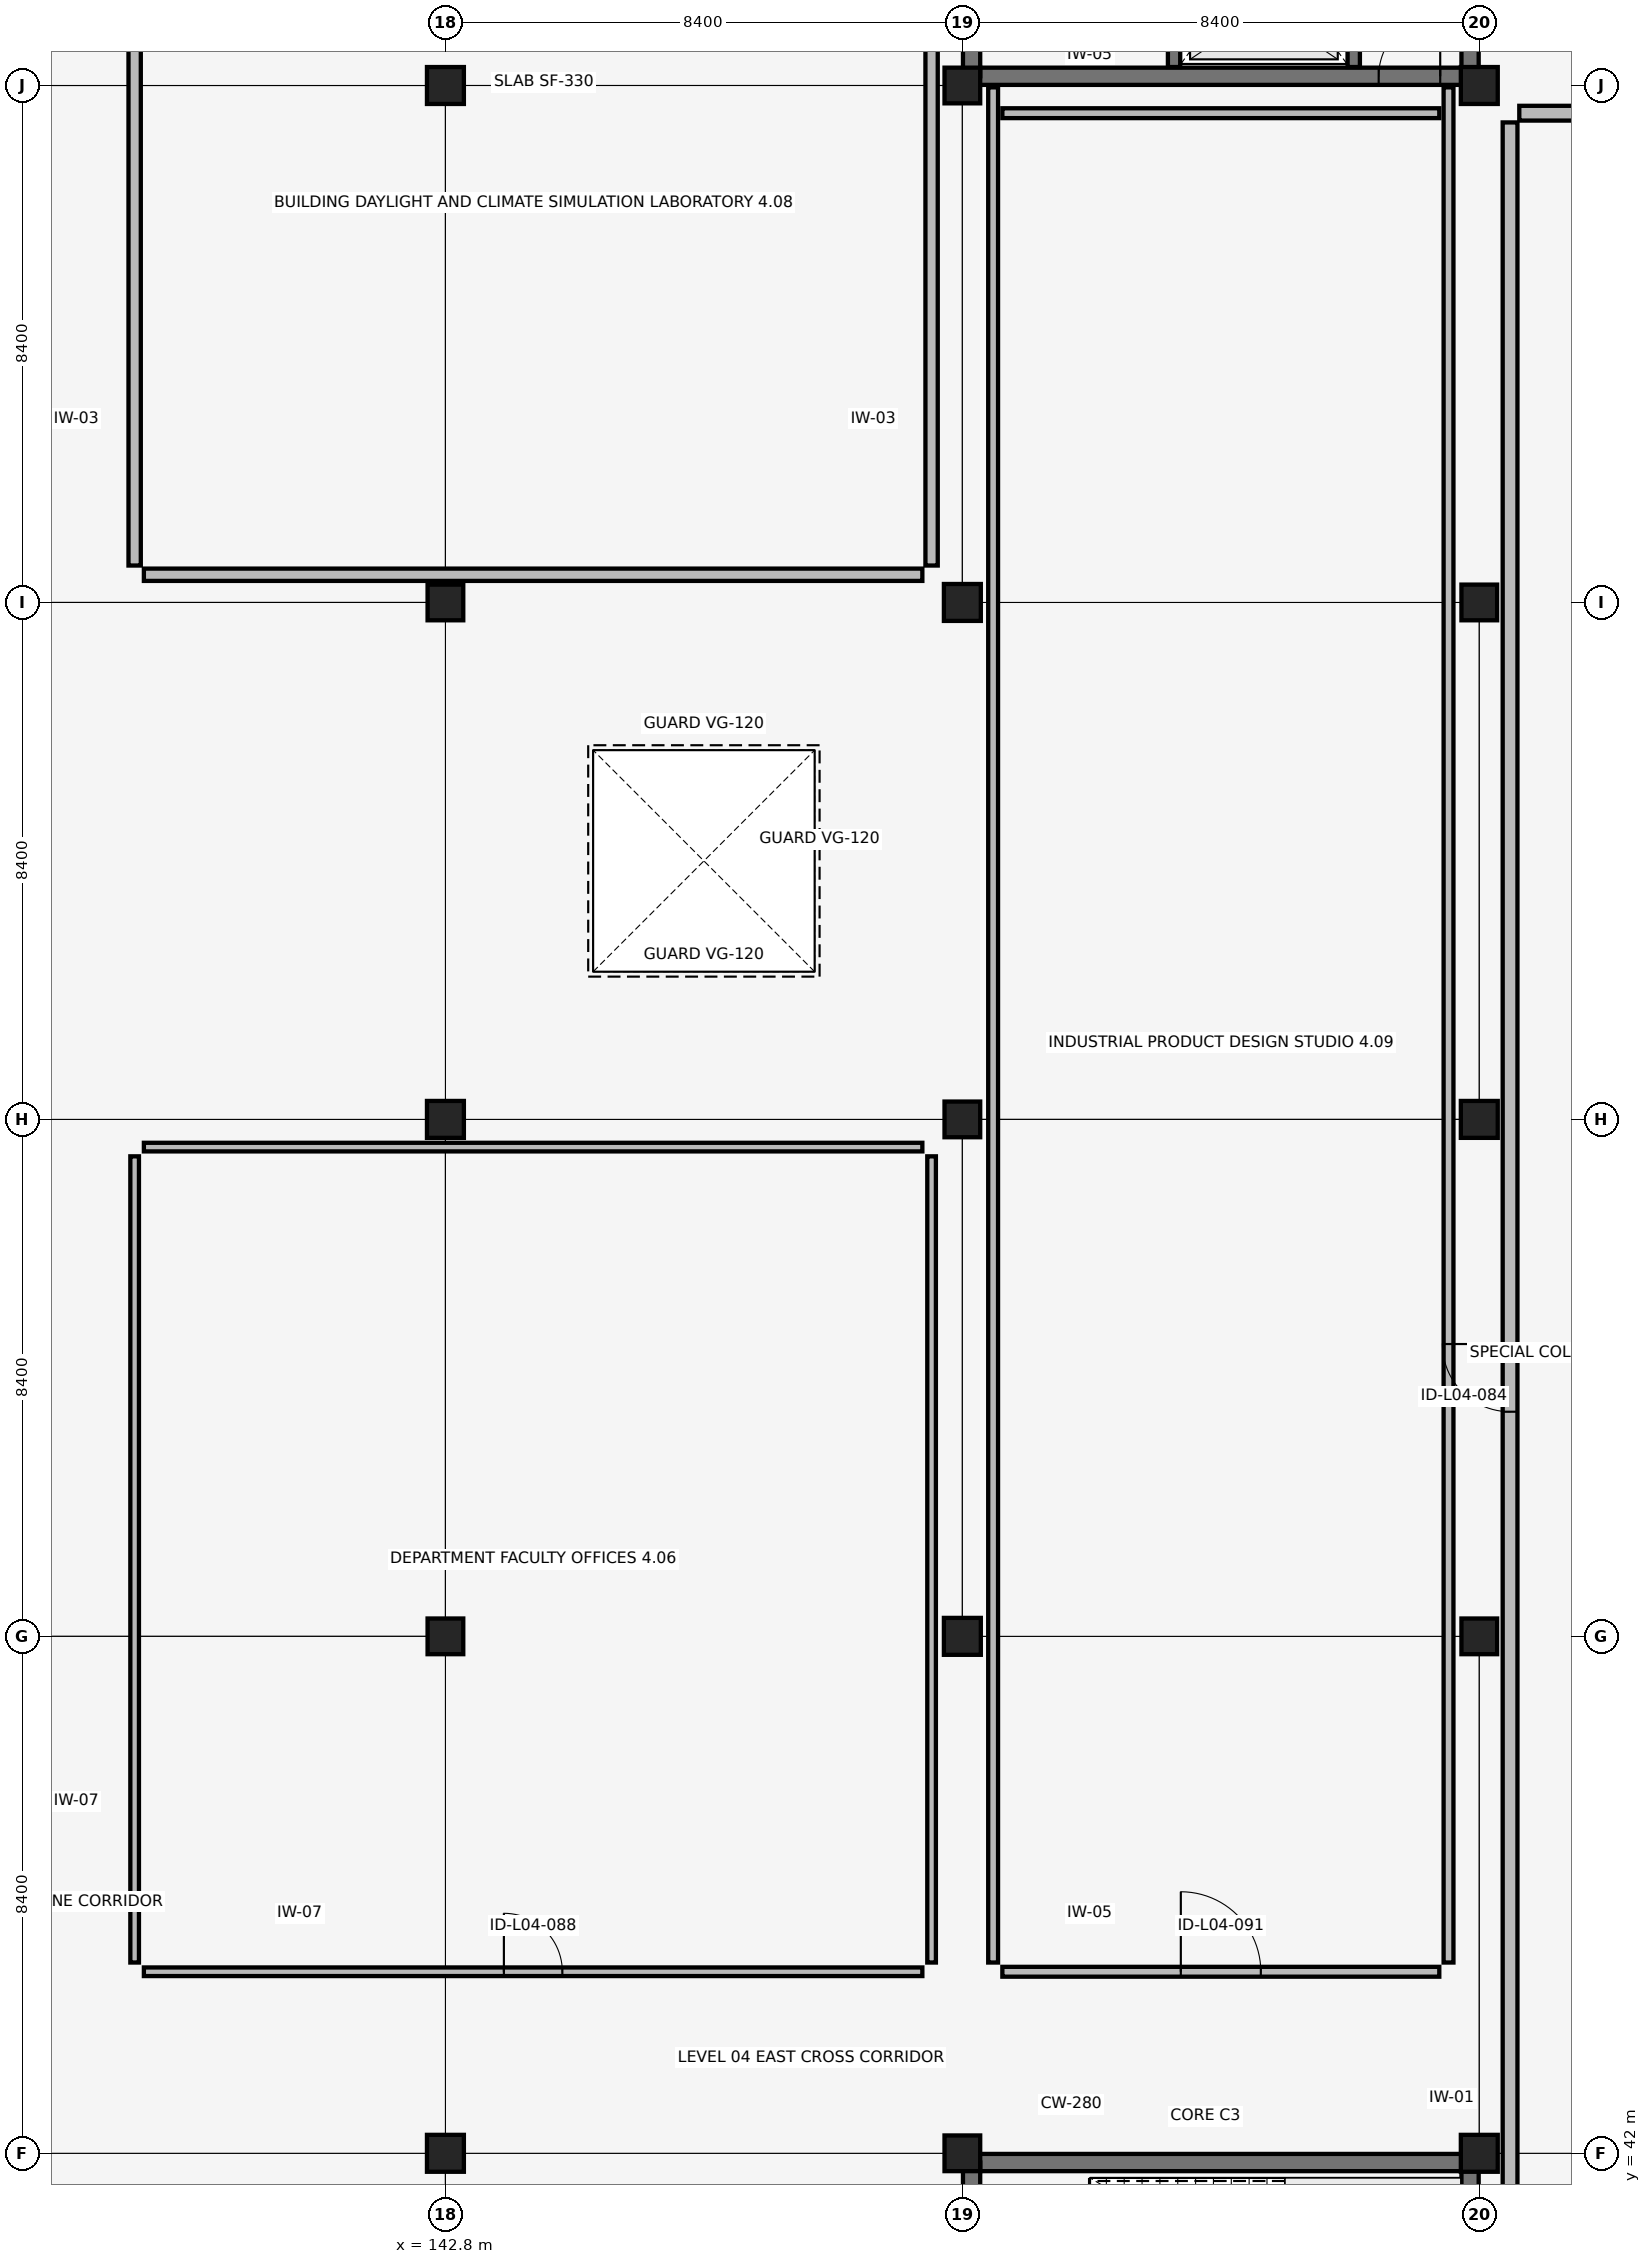
"""IFC4 building model, lengths in metres.
Left out: names, types, materials, properties, quantities, classifications, styles, units other than length and angle.
Written with IfcOpenShell. Run it as: python <this file> out.ifc"""

import sys

from ifc_helpers import new_model, si_unit, direction, frame, frame_2d, origin, origin_2d, place, context, subcontext, project, spatial, rectangle, extrude, element, fill, save


model = new_model("IFC4")
c1 = context("Model", 3, precision=1e-05, world=origin(), true_north=direction((0.0, 1.0)))
c2 = subcontext(c1, "Body", "Model", "MODEL_VIEW")
j1 = project(units=[si_unit("LENGTHUNIT", "METRE"), si_unit("PLANEANGLEUNIT", "RADIAN")], contexts=[c1])
p1 = place(None, origin())
s1 = spatial("IfcSite", under=j1, at=p1, CompositionType="ELEMENT")
p2 = place(p1, origin())
s2 = spatial("IfcBuilding", under=s1, at=p2, CompositionType="ELEMENT")
p3 = place(p2, frame((0.0, 0.0, 18.02)))
s3 = spatial("IfcBuildingStorey", under=s2, at=p3, CompositionType="ELEMENT", Elevation=18.02)
p4 = place(p3, frame((151.35, 41.85, 0.0), z_axis=(0.0, 0.0, 1.0), x_axis=(1.0, 0.0, 0.0)))
e1 = element("IfcWall", 1, at=p4, inside=s3, PredefinedType="SHEAR", context=c2, shape_type="SweptSolid", body=[
    extrude(rectangle(XDim=8.1, YDim=0.28, at=frame_2d((4.05, 0.0))), origin(), (0.0, 0.0, 1.0), 3.78),
])
p5 = place(p3, frame((151.35, 33.75, 0.0), z_axis=(0.0, 0.0, 1.0), x_axis=(0.0, 1.0, 0.0)))
e2 = element("IfcWall", 2, at=p5, inside=s3, PredefinedType="SHEAR", context=c2, shape_type="SweptSolid", body=[
    extrude(rectangle(XDim=8.1, YDim=0.28, at=frame_2d((4.05, 0.0))), origin(), (0.0, 0.0, 1.0), 3.78),
])
p6 = place(p5, frame((1.325, 0.0, 0.0)))
e3 = element("IfcOpeningElement", 3, at=p6, cuts=e2, PredefinedType="OPENING", context=c2, shape_type="SweptSolid", body=[
    extrude(rectangle(XDim=1.45, YDim=2.15, at=frame_2d((0.725, 1.075))), frame((0.0, 0.15, 0.0), z_axis=(0.0, -1.0, 0.0), x_axis=(1.0, 0.0, 0.0)), (0.0, 0.0, 1.0), 0.3),
])
p7 = place(p3, frame((159.45, 33.75, 0.0), z_axis=(0.0, 0.0, 1.0), x_axis=(0.0, 1.0, 0.0)))
e4 = element("IfcWall", 4, at=p7, inside=s3, PredefinedType="SHEAR", context=c2, shape_type="SweptSolid", body=[
    extrude(rectangle(XDim=8.1, YDim=0.28, at=frame_2d((4.05, 0.0))), origin(), (0.0, 0.0, 1.0), 3.78),
])
p8 = place(p3, frame((151.35, 75.75, 0.0), z_axis=(0.0, 0.0, 1.0), x_axis=(1.0, 0.0, 0.0)))
e5 = element("IfcWall", 5, at=p8, inside=s3, PredefinedType="SHEAR", context=c2, shape_type="SweptSolid", body=[
    extrude(rectangle(XDim=8.1, YDim=0.28, at=frame_2d((4.05, 0.0))), origin(), (0.0, 0.0, 1.0), 3.78),
])
p9 = place(p8, frame((6.615, 0.0, 0.0)))
e6 = element("IfcOpeningElement", 6, at=p9, cuts=e5, PredefinedType="OPENING", context=c2, shape_type="SweptSolid", body=[
    extrude(rectangle(XDim=1.0, YDim=2.15, at=frame_2d((0.5, 1.075))), frame((0.0, 0.15, 0.0), z_axis=(0.0, -1.0, 0.0), x_axis=(1.0, 0.0, 0.0)), (0.0, 0.0, 1.0), 0.3),
])
p10 = place(p3, frame((151.35, 75.75, 0.0), z_axis=(0.0, 0.0, 1.0), x_axis=(0.0, 1.0, 0.0)))
e7 = element("IfcWall", 7, at=p10, inside=s3, PredefinedType="SHEAR", context=c2, shape_type="SweptSolid", body=[
    extrude(rectangle(XDim=8.1, YDim=0.28, at=frame_2d((4.05, 0.0))), origin(), (0.0, 0.0, 1.0), 3.78),
])
p11 = place(p10, frame((1.325, 0.0, 0.0)))
e8 = element("IfcOpeningElement", 8, at=p11, cuts=e7, PredefinedType="OPENING", context=c2, shape_type="SweptSolid", body=[
    extrude(rectangle(XDim=1.45, YDim=2.15, at=frame_2d((0.725, 1.075))), frame((0.0, 0.15, 0.0), z_axis=(0.0, -1.0, 0.0), x_axis=(1.0, 0.0, 0.0)), (0.0, 0.0, 1.0), 0.3),
])
p12 = place(p3, frame((159.45, 75.75, 0.0), z_axis=(0.0, 0.0, 1.0), x_axis=(0.0, 1.0, 0.0)))
e9 = element("IfcWall", 9, at=p12, inside=s3, PredefinedType="SHEAR", context=c2, shape_type="SweptSolid", body=[
    extrude(rectangle(XDim=8.1, YDim=0.28, at=frame_2d((4.05, 0.0))), origin(), (0.0, 0.0, 1.0), 3.78),
])
p13 = place(p3, frame((142.8, 42.0, 0.0), z_axis=(0.0, 0.0, 1.0), x_axis=(1.0, 0.0, 0.0)))
e10 = element("IfcColumn", 10, at=p13, inside=s3, PredefinedType="COLUMN", context=c2, shape_type="SweptSolid", body=[
    extrude(rectangle(XDim=0.6, YDim=0.6, at=origin_2d()), origin(), (0.0, 0.0, 1.0), 3.78),
])
p14 = place(p3, frame((142.8, 50.4, 0.0), z_axis=(0.0, 0.0, 1.0), x_axis=(1.0, 0.0, 0.0)))
e11 = element("IfcColumn", 11, at=p14, inside=s3, PredefinedType="COLUMN", context=c2, shape_type="SweptSolid", body=[
    extrude(rectangle(XDim=0.58, YDim=0.58, at=origin_2d()), origin(), (0.0, 0.0, 1.0), 3.78),
])
p15 = place(p3, frame((142.8, 58.8, 0.0), z_axis=(0.0, 0.0, 1.0), x_axis=(1.0, 0.0, 0.0)))
e12 = element("IfcColumn", 12, at=p15, inside=s3, PredefinedType="COLUMN", context=c2, shape_type="SweptSolid", body=[
    extrude(rectangle(XDim=0.6, YDim=0.6, at=origin_2d()), origin(), (0.0, 0.0, 1.0), 3.78),
])
p16 = place(p3, frame((142.8, 67.2, 0.0), z_axis=(0.0, 0.0, 1.0), x_axis=(1.0, 0.0, 0.0)))
e13 = element("IfcColumn", 13, at=p16, inside=s3, PredefinedType="COLUMN", context=c2, shape_type="SweptSolid", body=[
    extrude(rectangle(XDim=0.58, YDim=0.58, at=origin_2d()), origin(), (0.0, 0.0, 1.0), 3.78),
])
p17 = place(p3, frame((142.8, 75.6, 0.0), z_axis=(0.0, 0.0, 1.0), x_axis=(1.0, 0.0, 0.0)))
e14 = element("IfcColumn", 14, at=p17, inside=s3, PredefinedType="COLUMN", context=c2, shape_type="SweptSolid", body=[
    extrude(rectangle(XDim=0.6, YDim=0.6, at=origin_2d()), origin(), (0.0, 0.0, 1.0), 3.78),
])
p18 = place(p3, frame((151.2, 42.0, 0.0), z_axis=(0.0, 0.0, 1.0), x_axis=(1.0, 0.0, 0.0)))
e15 = element("IfcColumn", 15, at=p18, inside=s3, PredefinedType="COLUMN", context=c2, shape_type="SweptSolid", body=[
    extrude(rectangle(XDim=0.58, YDim=0.58, at=origin_2d()), origin(), (0.0, 0.0, 1.0), 3.78),
])
p19 = place(p3, frame((151.2, 50.4, 0.0), z_axis=(0.0, 0.0, 1.0), x_axis=(1.0, 0.0, 0.0)))
e16 = element("IfcColumn", 16, at=p19, inside=s3, PredefinedType="COLUMN", context=c2, shape_type="SweptSolid", body=[
    extrude(rectangle(XDim=0.6, YDim=0.6, at=origin_2d()), origin(), (0.0, 0.0, 1.0), 3.78),
])
p20 = place(p3, frame((151.2, 58.8, 0.0), z_axis=(0.0, 0.0, 1.0), x_axis=(1.0, 0.0, 0.0)))
e17 = element("IfcColumn", 17, at=p20, inside=s3, PredefinedType="COLUMN", context=c2, shape_type="SweptSolid", body=[
    extrude(rectangle(XDim=0.58, YDim=0.58, at=origin_2d()), origin(), (0.0, 0.0, 1.0), 3.78),
])
p21 = place(p3, frame((151.2, 67.2, 0.0), z_axis=(0.0, 0.0, 1.0), x_axis=(1.0, 0.0, 0.0)))
e18 = element("IfcColumn", 18, at=p21, inside=s3, PredefinedType="COLUMN", context=c2, shape_type="SweptSolid", body=[
    extrude(rectangle(XDim=0.6, YDim=0.6, at=origin_2d()), origin(), (0.0, 0.0, 1.0), 3.78),
])
p22 = place(p3, frame((151.2, 75.6, 0.0), z_axis=(0.0, 0.0, 1.0), x_axis=(1.0, 0.0, 0.0)))
e19 = element("IfcColumn", 19, at=p22, inside=s3, PredefinedType="COLUMN", context=c2, shape_type="SweptSolid", body=[
    extrude(rectangle(XDim=0.58, YDim=0.58, at=origin_2d()), origin(), (0.0, 0.0, 1.0), 3.78),
])
p23 = place(p3, frame((159.6, 42.0, 0.0), z_axis=(0.0, 0.0, 1.0), x_axis=(1.0, 0.0, 0.0)))
e20 = element("IfcColumn", 20, at=p23, inside=s3, PredefinedType="COLUMN", context=c2, shape_type="SweptSolid", body=[
    extrude(rectangle(XDim=0.6, YDim=0.6, at=origin_2d()), origin(), (0.0, 0.0, 1.0), 3.78),
])
p24 = place(p3, frame((159.6, 50.4, 0.0), z_axis=(0.0, 0.0, 1.0), x_axis=(1.0, 0.0, 0.0)))
e21 = element("IfcColumn", 21, at=p24, inside=s3, PredefinedType="COLUMN", context=c2, shape_type="SweptSolid", body=[
    extrude(rectangle(XDim=0.58, YDim=0.58, at=origin_2d()), origin(), (0.0, 0.0, 1.0), 3.78),
])
p25 = place(p3, frame((159.6, 58.8, 0.0), z_axis=(0.0, 0.0, 1.0), x_axis=(1.0, 0.0, 0.0)))
e22 = element("IfcColumn", 22, at=p25, inside=s3, PredefinedType="COLUMN", context=c2, shape_type="SweptSolid", body=[
    extrude(rectangle(XDim=0.6, YDim=0.6, at=origin_2d()), origin(), (0.0, 0.0, 1.0), 3.78),
])
p26 = place(p3, frame((159.6, 67.2, 0.0), z_axis=(0.0, 0.0, 1.0), x_axis=(1.0, 0.0, 0.0)))
e23 = element("IfcColumn", 23, at=p26, inside=s3, PredefinedType="COLUMN", context=c2, shape_type="SweptSolid", body=[
    extrude(rectangle(XDim=0.58, YDim=0.58, at=origin_2d()), origin(), (0.0, 0.0, 1.0), 3.78),
])
p27 = place(p3, frame((159.6, 75.6, 0.0), z_axis=(0.0, 0.0, 1.0), x_axis=(1.0, 0.0, 0.0)))
e24 = element("IfcColumn", 24, at=p27, inside=s3, PredefinedType="COLUMN", context=c2, shape_type="SweptSolid", body=[
    extrude(rectangle(XDim=0.6, YDim=0.6, at=origin_2d()), origin(), (0.0, 0.0, 1.0), 3.78),
])
p28 = place(p3, frame((154.64, 75.9, 0.0), z_axis=(0.0, 0.0, 1.0), x_axis=(0.0, 1.0, 0.0)))
e25 = element("IfcWall", 25, at=p28, inside=s3, PredefinedType="SHEAR", context=c2, shape_type="SweptSolid", body=[
    extrude(rectangle(XDim=3.8, YDim=0.2, at=frame_2d((1.9, 0.0))), origin(), (0.0, 0.0, 1.0), 3.78),
])
p29 = place(p28, frame((0.375, 0.0, 0.0)))
e26 = element("IfcOpeningElement", 26, at=p29, cuts=e25, PredefinedType="OPENING", context=c2, shape_type="SweptSolid", body=[
    extrude(rectangle(XDim=1.1, YDim=2.15, at=frame_2d((0.55, 1.075))), frame((0.0, 0.11, 0.0), z_axis=(0.0, -1.0, 0.0), x_axis=(1.0, 0.0, 0.0)), (0.0, 0.0, 1.0), 0.22),
])
p30 = place(p28, frame((2.325, 0.0, 0.0)))
e27 = element("IfcOpeningElement", 27, at=p30, cuts=e25, PredefinedType="OPENING", context=c2, shape_type="SweptSolid", body=[
    extrude(rectangle(XDim=1.1, YDim=2.15, at=frame_2d((0.55, 1.075))), frame((0.0, 0.11, 0.0), z_axis=(0.0, -1.0, 0.0), x_axis=(1.0, 0.0, 0.0)), (0.0, 0.0, 1.0), 0.22),
])
p31 = place(p3, frame((157.56, 75.9, 0.0), z_axis=(0.0, 0.0, 1.0), x_axis=(0.0, 1.0, 0.0)))
e28 = element("IfcWall", 28, at=p31, inside=s3, PredefinedType="SHEAR", context=c2, shape_type="SweptSolid", body=[
    extrude(rectangle(XDim=3.8, YDim=0.2, at=frame_2d((1.9, 0.0))), origin(), (0.0, 0.0, 1.0), 3.78),
])
p32 = place(p3, frame((160.1, 34.2, 0.0), z_axis=(0.0, 0.0, 1.0), x_axis=(0.0, 1.0, 0.0)))
e29 = element("IfcWall", 29, at=p32, inside=s3, PredefinedType="PARTITIONING", context=c2, shape_type="SweptSolid", body=[
    extrude(rectangle(XDim=40.8, YDim=0.24, at=frame_2d((20.4, 0.0))), origin(), (0.0, 0.0, 1.0), 3.08),
])
p33 = place(p32, frame((19.85, 0.0, 0.0)))
e30 = element("IfcOpeningElement", 30, at=p33, cuts=e29, PredefinedType="OPENING", context=c2, shape_type="SweptSolid", body=[
    extrude(rectangle(XDim=1.1, YDim=2.15, at=frame_2d((0.55, 1.075))), frame((0.0, 0.13, 0.0), z_axis=(0.0, -1.0, 0.0), x_axis=(1.0, 0.0, 0.0)), (0.0, 0.0, 1.0), 0.26),
])
p34 = place(p3, frame((160.25, 75.15, 0.0), z_axis=(0.0, 0.0, 1.0), x_axis=(1.0, 0.0, 0.0)))
e31 = element("IfcWall", 31, at=p34, inside=s3, PredefinedType="PARTITIONING", context=c2, shape_type="SweptSolid", body=[
    extrude(rectangle(XDim=7.57, YDim=0.24, at=frame_2d((3.785, 0.0))), origin(), (0.0, 0.0, 1.0), 3.18),
])
p35 = place(p3, frame((137.9, 44.95, 0.0), z_axis=(0.0, 0.0, 1.0), x_axis=(1.0, 0.0, 0.0)))
e32 = element("IfcWall", 32, at=p35, inside=s3, PredefinedType="PARTITIONING", context=c2, shape_type="SweptSolid", body=[
    extrude(rectangle(XDim=12.65, YDim=0.14, at=frame_2d((6.325, 0.0))), origin(), (0.0, 0.0, 1.0), 3.38),
])
p36 = place(p35, frame((5.85, 0.0, 0.0)))
e33 = element("IfcOpeningElement", 33, at=p36, cuts=e32, PredefinedType="OPENING", context=c2, shape_type="SweptSolid", body=[
    extrude(rectangle(XDim=0.95, YDim=2.1, at=frame_2d((0.475, 1.05))), frame((0.0, 0.08, 0.0), z_axis=(0.0, -1.0, 0.0), x_axis=(1.0, 0.0, 0.0)), (0.0, 0.0, 1.0), 0.16),
])
p37 = place(p3, frame((137.75, 45.1, 0.0), z_axis=(0.0, 0.0, 1.0), x_axis=(0.0, 1.0, 0.0)))
e34 = element("IfcWall", 34, at=p37, inside=s3, PredefinedType="PARTITIONING", context=c2, shape_type="SweptSolid", body=[
    extrude(rectangle(XDim=13.1, YDim=0.14, at=frame_2d((6.55, 0.0))), origin(), (0.0, 0.0, 1.0), 3.08),
])
p38 = place(p3, frame((137.9, 58.35, 0.0), z_axis=(0.0, 0.0, 1.0), x_axis=(1.0, 0.0, 0.0)))
e35 = element("IfcWall", 35, at=p38, inside=s3, PredefinedType="PARTITIONING", context=c2, shape_type="SweptSolid", body=[
    extrude(rectangle(XDim=12.65, YDim=0.14, at=frame_2d((6.325, 0.0))), origin(), (0.0, 0.0, 1.0), 3.38),
])
p39 = place(p3, frame((150.7, 45.1, 0.0), z_axis=(0.0, 0.0, 1.0), x_axis=(0.0, 1.0, 0.0)))
e36 = element("IfcWall", 36, at=p39, inside=s3, PredefinedType="PARTITIONING", context=c2, shape_type="SweptSolid", body=[
    extrude(rectangle(XDim=13.1, YDim=0.14, at=frame_2d((6.55, 0.0))), origin(), (0.0, 0.0, 1.0), 3.08),
])
for number, where, z_axis, x_axis in (
    (37, (137.75, 67.8, 0.0), (0.0, 0.0, 1.0), (0.0, 1.0, 0.0)),
    (38, (150.7, 67.8, 0.0), (0.0, 0.0, 1.0), (0.0, 1.0, 0.0)),
):
    element("IfcWall", number, at=place(p3, frame(where, z_axis=z_axis, x_axis=x_axis)), inside=s3, PredefinedType="PARTITIONING", context=c2, shape_type="SweptSolid", body=[
        extrude(rectangle(XDim=15.6, YDim=0.2, at=frame_2d((7.8, 0.0))), origin(), (0.0, 0.0, 1.0), 3.16),
    ])
p40 = place(p3, frame((137.9, 67.65, 0.0), z_axis=(0.0, 0.0, 1.0), x_axis=(1.0, 0.0, 0.0)))
e39 = element("IfcWall", 39, at=p40, inside=s3, PredefinedType="PARTITIONING", context=c2, shape_type="SweptSolid", body=[
    extrude(rectangle(XDim=12.65, YDim=0.2, at=frame_2d((6.325, 0.0))), origin(), (0.0, 0.0, 1.0), 3.38),
])
p41 = place(p3, frame((151.85, 44.95, 0.0), z_axis=(0.0, 0.0, 1.0), x_axis=(1.0, 0.0, 0.0)))
e40 = element("IfcWall", 40, at=p41, inside=s3, PredefinedType="PARTITIONING", context=c2, shape_type="SweptSolid", body=[
    extrude(rectangle(XDim=7.1, YDim=0.16, at=frame_2d((3.55, 0.0))), origin(), (0.0, 0.0, 1.0), 3.78),
])
p42 = place(p41, frame((2.9, 0.0, 0.0)))
e41 = element("IfcOpeningElement", 41, at=p42, cuts=e40, PredefinedType="OPENING", context=c2, shape_type="SweptSolid", body=[
    extrude(rectangle(XDim=1.3, YDim=2.2, at=frame_2d((0.65, 1.1))), frame((0.0, 0.09, 0.0), z_axis=(0.0, -1.0, 0.0), x_axis=(1.0, 0.0, 0.0)), (0.0, 0.0, 1.0), 0.18),
])
p43 = place(p3, frame((151.85, 75.15, 0.0), z_axis=(0.0, 0.0, 1.0), x_axis=(1.0, 0.0, 0.0)))
e42 = element("IfcWall", 42, at=p43, inside=s3, PredefinedType="PARTITIONING", context=c2, shape_type="SweptSolid", body=[
    extrude(rectangle(XDim=7.1, YDim=0.16, at=frame_2d((3.55, 0.0))), origin(), (0.0, 0.0, 1.0), 3.78),
])
for number, where, z_axis, x_axis in (
    (43, (151.7, 45.1, 0.0), (0.0, 0.0, 1.0), (0.0, 1.0, 0.0)),
    (44, (159.1, 45.1, 0.0), (0.0, 0.0, 1.0), (0.0, 1.0, 0.0)),
):
    element("IfcWall", number, at=place(p3, frame(where, z_axis=z_axis, x_axis=x_axis)), inside=s3, PredefinedType="PARTITIONING", context=c2, shape_type="SweptSolid", body=[
        extrude(rectangle(XDim=30.47, YDim=0.16, at=frame_2d((15.235, 0.0))), origin(), (0.0, 0.0, 1.0), 3.08),
    ])
p44 = place(p9, origin())
e45 = element("IfcDoor", 45, at=p44, inside=s3, OperationType="SINGLE_SWING_RIGHT", PredefinedType="DOOR", context=c2, shape_type="SweptSolid", body=[
    extrude(rectangle(XDim=1.0, YDim=2.15, at=frame_2d((0.5, 1.075))), frame((0.0, 0.025, 0.0), z_axis=(0.0, -1.0, 0.0), x_axis=(1.0, 0.0, 0.0)), (0.0, 0.0, 1.0), 0.05),
])
fill(e6, e45)
p45 = place(p33, origin())
e46 = element("IfcDoor", 46, at=p45, inside=s3, OperationType="SINGLE_SWING_RIGHT", PredefinedType="DOOR", context=c2, shape_type="SweptSolid", body=[
    extrude(rectangle(XDim=1.1, YDim=2.15, at=frame_2d((0.55, 1.075))), frame((0.0, 0.025, 0.0), z_axis=(0.0, -1.0, 0.0), x_axis=(1.0, 0.0, 0.0)), (0.0, 0.0, 1.0), 0.05),
])
fill(e30, e46)
p46 = place(p36, origin())
e47 = element("IfcDoor", 47, at=p46, inside=s3, OperationType="SINGLE_SWING_LEFT", PredefinedType="DOOR", context=c2, shape_type="SweptSolid", body=[
    extrude(rectangle(XDim=0.95, YDim=2.1, at=frame_2d((0.475, 1.05))), frame((0.0, 0.025, 0.0), z_axis=(0.0, -1.0, 0.0), x_axis=(1.0, 0.0, 0.0)), (0.0, 0.0, 1.0), 0.05),
])
fill(e33, e47)
p47 = place(p42, origin())
e48 = element("IfcDoor", 48, at=p47, inside=s3, OperationType="SINGLE_SWING_LEFT", PredefinedType="DOOR", context=c2, shape_type="SweptSolid", body=[
    extrude(rectangle(XDim=1.3, YDim=2.2, at=frame_2d((0.65, 1.1))), frame((0.0, 0.025, 0.0), z_axis=(0.0, -1.0, 0.0), x_axis=(1.0, 0.0, 0.0)), (0.0, 0.0, 1.0), 0.05),
])
fill(e41, e48)
save(model, sys.argv[1])
